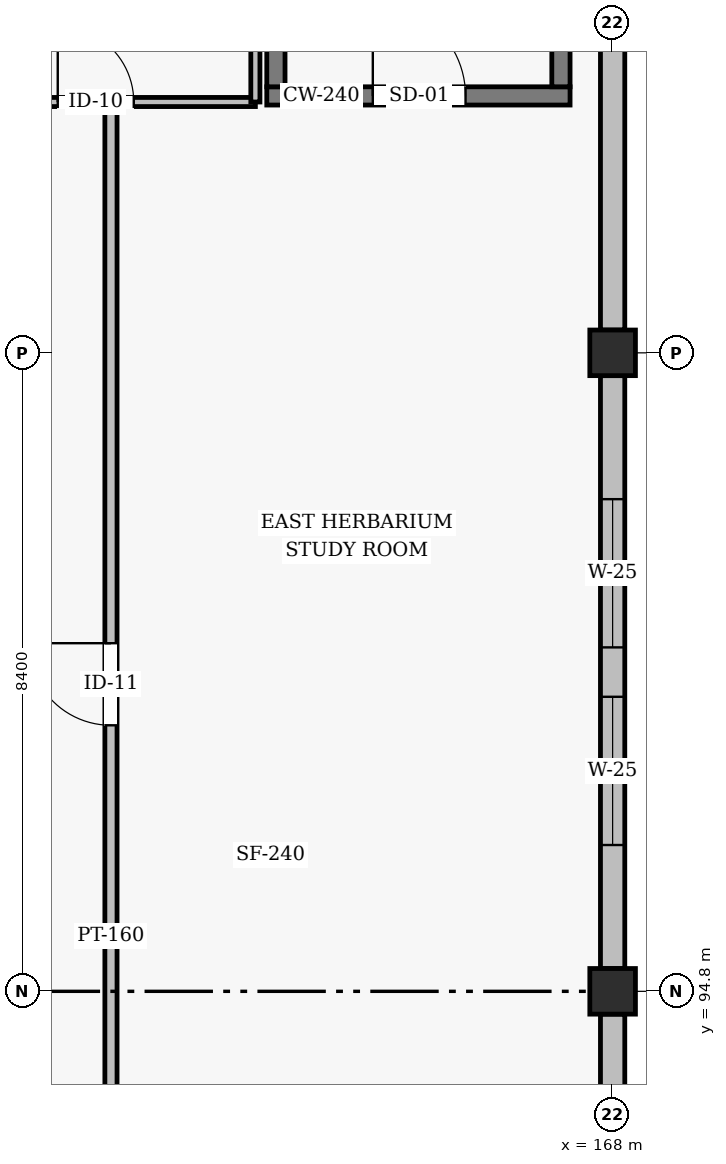
"""IFC4 building model, lengths in metres.
Left out: names, types, materials, properties, quantities, classifications, styles, units other than length and angle.
Written with IfcOpenShell. Run it as: python <this file> out.ifc"""

import sys

from ifc_helpers import new_model, si_unit, direction, frame, frame_2d, origin, origin_2d, place, context, subcontext, project, spatial, rectangle, hollow_rectangle, extrude, element, fill, save


model = new_model("IFC4")
c1 = context("Model", 3, precision=1e-05, world=origin(), true_north=direction((0.0, 1.0)))
c2 = subcontext(c1, "Body", "Model", "MODEL_VIEW")
j1 = project(units=[si_unit("LENGTHUNIT", "METRE"), si_unit("PLANEANGLEUNIT", "RADIAN")], contexts=[c1])
p1 = place(None, origin())
s1 = spatial("IfcSite", under=j1, at=p1, CompositionType="ELEMENT")
p2 = place(p1, origin())
s2 = spatial("IfcBuilding", under=s1, at=p2, CompositionType="ELEMENT")
p3 = place(p2, frame((0.0, 0.0, 4.8)))
s3 = spatial("IfcBuildingStorey", under=s2, at=p3, CompositionType="ELEMENT", Elevation=4.8)
for number, where, z_axis, x_axis in (
    (1, (168.0, 94.8, 0.0), (0.0, 0.0, 1.0), (1.0, 0.0, 0.0)),
    (2, (168.0, 103.2, 0.0), (0.0, 0.0, 1.0), (1.0, 0.0, 0.0)),
):
    element("IfcColumn", number, at=place(p3, frame(where, z_axis=z_axis, x_axis=x_axis)), inside=s3, PredefinedType="COLUMN", context=c2, shape_type="SweptSolid", body=[
        extrude(hollow_rectangle(XDim=0.6, YDim=0.6, WallThickness=0.025, InnerFilletRadius=0.025, OuterFilletRadius=0.05, at=origin_2d()), origin(), (0.0, 0.0, 1.0), 4.2),
    ])
p4 = place(p3, frame((168.0, 86.7, 0.0), z_axis=(0.0, 0.0, 1.0), x_axis=(0.0, 1.0, 0.0)))
e3 = element("IfcWall", 3, at=p4, inside=s3, PredefinedType="SOLIDWALL", context=c2, shape_type="SweptSolid", body=[
    extrude(rectangle(XDim=7.8, YDim=0.32, at=frame_2d((3.9, 0.0))), origin(), (0.0, 0.0, 1.0), 3.455),
])
p5 = place(p4, frame((2.15, 0.0, 1.1)))
e4 = element("IfcOpeningElement", 4, at=p5, cuts=e3, PredefinedType="OPENING", context=c2, shape_type="SweptSolid", body=[
    extrude(rectangle(XDim=0.9, YDim=1.5, at=frame_2d((0.45, 0.75))), frame((0.0, 0.17, 0.0), z_axis=(0.0, -1.0, 0.0), x_axis=(1.0, 0.0, 0.0)), (0.0, 0.0, 1.0), 0.34),
])
p6 = place(p4, frame((4.75, 0.0, 1.1)))
e5 = element("IfcOpeningElement", 5, at=p6, cuts=e3, PredefinedType="OPENING", context=c2, shape_type="SweptSolid", body=[
    extrude(rectangle(XDim=0.9, YDim=1.5, at=frame_2d((0.45, 0.75))), frame((0.0, 0.17, 0.0), z_axis=(0.0, -1.0, 0.0), x_axis=(1.0, 0.0, 0.0)), (0.0, 0.0, 1.0), 0.34),
])
p7 = place(p3, frame((168.0, 95.1, 0.0), z_axis=(0.0, 0.0, 1.0), x_axis=(0.0, 1.0, 0.0)))
e6 = element("IfcWall", 6, at=p7, inside=s3, PredefinedType="SOLIDWALL", context=c2, shape_type="SweptSolid", body=[
    extrude(rectangle(XDim=7.8, YDim=0.32, at=frame_2d((3.9, 0.0))), origin(), (0.0, 0.0, 1.0), 3.455),
])
p8 = place(p7, frame((1.625, 0.0, 0.8)))
e7 = element("IfcOpeningElement", 7, at=p8, cuts=e6, PredefinedType="OPENING", context=c2, shape_type="SweptSolid", body=[
    extrude(rectangle(XDim=1.95, YDim=2.15, at=frame_2d((0.975, 1.075))), frame((0.0, 0.17, 0.0), z_axis=(0.0, -1.0, 0.0), x_axis=(1.0, 0.0, 0.0)), (0.0, 0.0, 1.0), 0.34),
])
p9 = place(p7, frame((4.225, 0.0, 0.8)))
e8 = element("IfcOpeningElement", 8, at=p9, cuts=e6, PredefinedType="OPENING", context=c2, shape_type="SweptSolid", body=[
    extrude(rectangle(XDim=1.95, YDim=2.15, at=frame_2d((0.975, 1.075))), frame((0.0, 0.17, 0.0), z_axis=(0.0, -1.0, 0.0), x_axis=(1.0, 0.0, 0.0)), (0.0, 0.0, 1.0), 0.34),
])
p10 = place(p3, frame((168.0, 103.5, 0.0), z_axis=(0.0, 0.0, 1.0), x_axis=(0.0, 1.0, 0.0)))
e9 = element("IfcWall", 9, at=p10, inside=s3, PredefinedType="SOLIDWALL", context=c2, shape_type="SweptSolid", body=[
    extrude(rectangle(XDim=11.35, YDim=0.32, at=frame_2d((5.675, 0.0))), origin(), (0.0, 0.0, 1.0), 3.163),
])
p11 = place(p3, frame((163.45, 106.58, 0.0), z_axis=(0.0, 0.0, 1.0), x_axis=(1.0, 0.0, 0.0)))
e10 = element("IfcWall", 10, at=p11, inside=s3, PredefinedType="SHEAR", context=c2, shape_type="SweptSolid", body=[
    extrude(rectangle(XDim=3.99, YDim=0.24, at=frame_2d((1.995, 0.0))), origin(), (0.0, 0.0, 1.0), 3.955),
])
p12 = place(p11, frame((1.395, 0.0, 0.0)))
e11 = element("IfcOpeningElement", 11, at=p12, cuts=e10, PredefinedType="OPENING", context=c2, shape_type="SweptSolid", body=[
    extrude(rectangle(XDim=1.22, YDim=2.18, at=frame_2d((0.61, 1.09))), frame((0.0, 0.13, 0.0), z_axis=(0.0, -1.0, 0.0), x_axis=(1.0, 0.0, 0.0)), (0.0, 0.0, 1.0), 0.26),
])
for number, where, z_axis, x_axis in (
    (12, (163.57, 106.7, 0.0), (0.0, 0.0, 1.0), (0.0, 1.0, 0.0)),
    (13, (167.32, 106.7, 0.0), (0.0, 0.0, 1.0), (0.0, 1.0, 0.0)),
):
    element("IfcWall", number, at=place(p3, frame(where, z_axis=z_axis, x_axis=x_axis)), inside=s3, PredefinedType="SHEAR", context=c2, shape_type="SweptSolid", body=[
        extrude(rectangle(XDim=7.9, YDim=0.24, at=frame_2d((3.95, 0.0))), origin(), (0.0, 0.0, 1.0), 3.955),
    ])
p13 = place(p3, frame((161.4, 91.3, 0.0), z_axis=(0.0, 0.0, 1.0), x_axis=(0.0, 1.0, 0.0)))
e14 = element("IfcWall", 14, at=p13, inside=s3, PredefinedType="PARTITIONING", context=c2, shape_type="SweptSolid", body=[
    extrude(rectangle(XDim=15.1, YDim=0.16, at=frame_2d((7.55, 0.0))), origin(), (0.0, 0.0, 1.0), 3.305),
])
p14 = place(p13, frame((7.0, 0.0, 0.0)))
e15 = element("IfcOpeningElement", 15, at=p14, cuts=e14, PredefinedType="OPENING", context=c2, shape_type="SweptSolid", body=[
    extrude(rectangle(XDim=1.08, YDim=2.08, at=frame_2d((0.54, 1.04))), frame((0.0, 0.09, 0.0), z_axis=(0.0, -1.0, 0.0), x_axis=(1.0, 0.0, 0.0)), (0.0, 0.0, 1.0), 0.18),
])
p15 = place(p3, frame((159.1, 106.5, 0.0), z_axis=(0.0, 0.0, 1.0), x_axis=(1.0, 0.0, 0.0)))
e16 = element("IfcWall", 16, at=p15, inside=s3, PredefinedType="PARTITIONING", context=c2, shape_type="SweptSolid", body=[
    extrude(rectangle(XDim=4.2, YDim=0.12, at=frame_2d((2.1, 0.0))), origin(), (0.0, 0.0, 1.0), 3.955),
])
p16 = place(p15, frame((1.6, 0.0, 0.0)))
e17 = element("IfcOpeningElement", 17, at=p16, cuts=e16, PredefinedType="OPENING", context=c2, shape_type="SweptSolid", body=[
    extrude(rectangle(XDim=1.0, YDim=2.1, at=frame_2d((0.5, 1.05))), frame((0.0, 0.07, 0.0), z_axis=(0.0, -1.0, 0.0), x_axis=(1.0, 0.0, 0.0)), (0.0, 0.0, 1.0), 0.14),
])
p17 = place(p3, frame((163.3, 106.5, 0.0), z_axis=(0.0, 0.0, 1.0), x_axis=(0.0, 1.0, 0.0)))
e18 = element("IfcWall", 18, at=p17, inside=s3, PredefinedType="PARTITIONING", context=c2, shape_type="SweptSolid", body=[
    extrude(rectangle(XDim=8.3, YDim=0.12, at=frame_2d((4.15, 0.0))), origin(), (0.0, 0.0, 1.0), 3.955),
])
p18 = place(p8, origin())
e19 = element("IfcWindow", 19, at=p18, inside=s3, PartitioningType="SINGLE_PANEL", PredefinedType="WINDOW", context=c2, shape_type="SweptSolid", body=[
    extrude(rectangle(XDim=1.95, YDim=2.15, at=frame_2d((0.975, 1.075))), frame((0.0, 0.03, 0.0), z_axis=(0.0, -1.0, 0.0), x_axis=(1.0, 0.0, 0.0)), (0.0, 0.0, 1.0), 0.06),
])
fill(e7, e19)
p19 = place(p9, origin())
e20 = element("IfcWindow", 20, at=p19, inside=s3, PartitioningType="SINGLE_PANEL", PredefinedType="WINDOW", context=c2, shape_type="SweptSolid", body=[
    extrude(rectangle(XDim=1.95, YDim=2.15, at=frame_2d((0.975, 1.075))), frame((0.0, 0.03, 0.0), z_axis=(0.0, -1.0, 0.0), x_axis=(1.0, 0.0, 0.0)), (0.0, 0.0, 1.0), 0.06),
])
fill(e8, e20)
p20 = place(p12, origin())
e21 = element("IfcDoor", 21, at=p20, inside=s3, OperationType="SINGLE_SWING_LEFT", PredefinedType="DOOR", context=c2, shape_type="SweptSolid", body=[
    extrude(rectangle(XDim=1.22, YDim=2.18, at=frame_2d((0.61, 1.09))), frame((0.0, 0.025, 0.0), z_axis=(0.0, -1.0, 0.0), x_axis=(1.0, 0.0, 0.0)), (0.0, 0.0, 1.0), 0.05),
])
fill(e11, e21)
p21 = place(p14, origin())
e22 = element("IfcDoor", 22, at=p21, inside=s3, OperationType="SINGLE_SWING_RIGHT", PredefinedType="DOOR", context=c2, shape_type="SweptSolid", body=[
    extrude(rectangle(XDim=1.08, YDim=2.08, at=frame_2d((0.54, 1.04))), frame((0.0, 0.025, 0.0), z_axis=(0.0, -1.0, 0.0), x_axis=(1.0, 0.0, 0.0)), (0.0, 0.0, 1.0), 0.05),
])
fill(e15, e22)
p22 = place(p16, origin())
e23 = element("IfcDoor", 23, at=p22, inside=s3, OperationType="SINGLE_SWING_LEFT", PredefinedType="DOOR", context=c2, shape_type="SweptSolid", body=[
    extrude(rectangle(XDim=1.0, YDim=2.1, at=frame_2d((0.5, 1.05))), frame((0.0, 0.025, 0.0), z_axis=(0.0, -1.0, 0.0), x_axis=(1.0, 0.0, 0.0)), (0.0, 0.0, 1.0), 0.05),
])
fill(e17, e23)
save(model, sys.argv[1])
